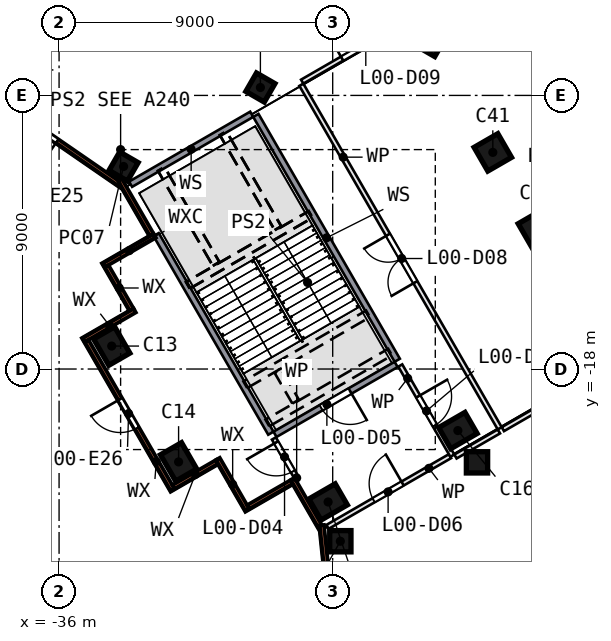
"""IFC4 building model, lengths in metres.
Left out: names, types, materials, properties, quantities, classifications, styles, units other than length and angle.
Written with IfcOpenShell. Run it as: python <this file> out.ifc"""

import sys

from ifc_helpers import new_model, si_unit, direction, frame, frame_2d, origin, origin_2d, place, context, subcontext, project, spatial, rectangle, extrude, element, fill, save


model = new_model("IFC4")
c1 = context("Model", 3, precision=1e-05, world=origin(), true_north=direction((0.0, 1.0)))
c2 = subcontext(c1, "Body", "Model", "MODEL_VIEW")
j1 = project(units=[si_unit("LENGTHUNIT", "METRE"), si_unit("PLANEANGLEUNIT", "RADIAN")], contexts=[c1])
p1 = place(None, origin())
s1 = spatial("IfcSite", under=j1, at=p1, CompositionType="ELEMENT")
p2 = place(p1, origin())
s2 = spatial("IfcBuilding", under=s1, at=p2, CompositionType="ELEMENT")
p3 = place(p2, origin())
s3 = spatial("IfcBuildingStorey", under=s2, at=p3, CompositionType="ELEMENT", Elevation=0.0)
p4 = place(p3, frame((-23.658, -6.846, 0.0), z_axis=(0.0, 0.0, 1.0), x_axis=(0.5, 0.866025404, 0.0)))
e1 = element("IfcColumn", 1, at=p4, inside=s3, PredefinedType="COLUMN", context=c2, shape_type="SweptSolid", body=[
    extrude(rectangle(XDim=1.5, YDim=0.9, at=origin_2d()), origin(), (0.0, 0.0, 1.0), 7.55),
])
for number, where, z_axis, x_axis in (
    (2, (-34.269, -17.245, 0.0), (0.0, 0.0, 1.0), (0.5, -0.866, 0.0)),
    (3, (-32.069, -21.055, 0.0), (0.0, 0.0, 1.0), (0.5, -0.866, 0.0)),
    (4, (-27.151, -22.373, 0.0), (0.0, 0.0, 1.0), (0.866, 0.5, 0.0)),
    (5, (-22.883, -20.024, 0.0), (0.0, 0.0, 1.0), (0.866, 0.5, 0.0)),
):
    element("IfcColumn", number, at=place(p3, frame(where, z_axis=z_axis, x_axis=x_axis)), inside=s3, PredefinedType="COLUMN", context=c2, shape_type="SweptSolid", body=[
        extrude(rectangle(XDim=1.0, YDim=0.8, at=origin_2d()), origin(), (0.0, 0.0, 1.0), 7.55),
    ])
for number, where, z_axis, x_axis in (
    (6, (-21.733, -10.873, 0.0), (0.0, 0.0, 1.0), (-0.866, -0.5, 0.0)),
    (7, (-20.283, -13.385, 0.0), (0.0, 0.0, 1.0), (-0.866, -0.5, 0.0)),
):
    element("IfcColumn", number, at=place(p3, frame(where, z_axis=z_axis, x_axis=x_axis)), inside=s3, PredefinedType="COLUMN", context=c2, shape_type="SweptSolid", body=[
        extrude(rectangle(XDim=0.9, YDim=0.9, at=origin_2d()), origin(), (0.0, 0.0, 1.0), 7.55),
    ])
for number, where, z_axis, x_axis in (
    (8, (-29.378, -8.74, 0.0), (0.0, 0.0, 1.0), (-0.866, 0.5, 0.0)),
    (9, (-33.878, -11.338, 0.0), (0.0, 0.0, 1.0), (-0.866, 0.5, 0.0)),
    (10, (-26.749, -23.665, 0.0), (0.0, 0.0, 1.0), (0.0, -1.0, 0.0)),
    (11, (-22.253, -21.07, 0.0), (0.0, 0.0, 1.0), (0.0, -1.0, 0.0)),
):
    element("IfcColumn", number, at=place(p3, frame(where, z_axis=z_axis, x_axis=x_axis)), inside=s3, PredefinedType="COLUMN", context=c2, shape_type="SweptSolid", body=[
        extrude(rectangle(XDim=0.7, YDim=0.7, at=origin_2d()), origin(), (0.0, 0.0, 1.0), 8.0),
    ])
p5 = place(p3, frame((-33.989, -11.93, 0.0), z_axis=(0.0, 0.0, 1.0), x_axis=(-0.823449914, 0.567388967, 0.0)))
e12 = element("IfcWall", 12, at=p5, inside=s3, PredefinedType="SOLIDWALL", context=c2, shape_type="SweptSolid", body=[
    extrude(rectangle(XDim=17.4, YDim=0.14, at=frame_2d((8.7, 0.0))), origin(), (0.0, 0.0, 1.0), 7.55),
])
p6 = place(p5, frame((7.264, 0.0, 0.0)))
e13 = element("IfcOpeningElement", 13, at=p6, cuts=e12, PredefinedType="OPENING", context=c2, shape_type="SweptSolid", body=[
    extrude(rectangle(XDim=1.1, YDim=2.4, at=frame_2d((0.55, 1.2))), frame((0.0, 0.08, 0.0), z_axis=(0.0, -1.0, 0.0), x_axis=(1.0, 0.0, 0.0)), (0.0, 0.0, 1.0), 0.16),
])
p7 = place(p5, frame((2.518, 0.0, 0.0)))
e14 = element("IfcOpeningElement", 14, at=p7, cuts=e12, PredefinedType="OPENING", context=c2, shape_type="SweptSolid", body=[
    extrude(rectangle(XDim=1.1, YDim=2.4, at=frame_2d((0.55, 1.2))), frame((0.0, 0.08, 0.0), z_axis=(0.0, -1.0, 0.0), x_axis=(1.0, 0.0, 0.0)), (0.0, 0.0, 1.0), 0.16),
])
p8 = place(p3, frame((-34.035, -11.71, 0.0), z_axis=(0.0, 0.0, 1.0), x_axis=(0.49995231, -0.866052936, 0.0)))
e15 = element("IfcWall", 15, at=p8, inside=s3, PredefinedType="SOLIDWALL", context=c2, shape_type="SweptSolid", body=[
    extrude(rectangle(XDim=2.176, YDim=0.14, at=frame_2d((1.088, 0.0))), origin(), (0.0, 0.0, 1.0), 7.55),
])
p9 = place(p3, frame((-32.851, -13.62, 0.0), z_axis=(0.0, 0.0, 1.0), x_axis=(-0.866011627, -0.500023862, 0.0)))
e16 = element("IfcWall", 16, at=p9, inside=s3, PredefinedType="SOLIDWALL", context=c2, shape_type="SweptSolid", body=[
    extrude(rectangle(XDim=1.94, YDim=0.14, at=frame_2d((0.97, 0.0))), origin(), (0.0, 0.0, 1.0), 7.55),
])
p10 = place(p3, frame((-34.436, -14.616, 0.0), z_axis=(0.0, 0.0, 1.0), x_axis=(0.500061949, -0.865989634, 0.0)))
e17 = element("IfcWall", 17, at=p10, inside=s3, PredefinedType="SOLIDWALL", context=c2, shape_type="SweptSolid", body=[
    extrude(rectangle(XDim=1.66, YDim=0.14, at=frame_2d((0.83, 0.0))), origin(), (0.0, 0.0, 1.0), 7.55),
])
p11 = place(p3, frame((-33.51, -16.079, 0.0), z_axis=(0.0, 0.0, 1.0), x_axis=(-0.866011627, -0.500023862, 0.0)))
e18 = element("IfcWall", 18, at=p11, inside=s3, PredefinedType="SOLIDWALL", context=c2, shape_type="SweptSolid", body=[
    extrude(rectangle(XDim=1.94, YDim=0.14, at=frame_2d((0.97, 0.0))), origin(), (0.0, 0.0, 1.0), 7.55),
])
p12 = place(p3, frame((-32.264, -21.977, 0.0), z_axis=(0.0, 0.0, 1.0), x_axis=(-0.499998748, 0.866026127, 0.0)))
e19 = element("IfcWall", 19, at=p12, inside=s3, PredefinedType="SOLIDWALL", context=c2, shape_type="SweptSolid", body=[
    extrude(rectangle(XDim=5.66, YDim=0.14, at=frame_2d((2.83, 0.0))), origin(), (0.0, 0.0, 1.0), 7.55),
])
p13 = place(p12, frame((2.35, 0.0, 0.0)))
e20 = element("IfcOpeningElement", 20, at=p13, cuts=e19, PredefinedType="OPENING", context=c2, shape_type="SweptSolid", body=[
    extrude(rectangle(XDim=1.1, YDim=2.4, at=frame_2d((0.55, 1.2))), frame((0.0, 0.08, 0.0), z_axis=(0.0, -1.0, 0.0), x_axis=(1.0, 0.0, 0.0)), (0.0, 0.0, 1.0), 0.16),
])
p14 = place(p3, frame((-32.239, -21.881, 0.0), z_axis=(0.0, 0.0, 1.0), x_axis=(0.866026406, 0.499998264, 0.0)))
e21 = element("IfcWall", 21, at=p14, inside=s3, PredefinedType="SOLIDWALL", context=c2, shape_type="SweptSolid", body=[
    extrude(rectangle(XDim=1.66, YDim=0.14, at=frame_2d((0.83, 0.0))), origin(), (0.0, 0.0, 1.0), 7.55),
])
p15 = place(p3, frame((-30.775, -20.955, 0.0), z_axis=(0.0, 0.0, 1.0), x_axis=(0.499969368, -0.866043088, 0.0)))
e22 = element("IfcWall", 22, at=p15, inside=s3, PredefinedType="SOLIDWALL", context=c2, shape_type="SweptSolid", body=[
    extrude(rectangle(XDim=1.94, YDim=0.14, at=frame_2d((0.97, 0.0))), origin(), (0.0, 0.0, 1.0), 7.55),
])
p16 = place(p3, frame((-29.78, -22.54, 0.0), z_axis=(0.0, 0.0, 1.0), x_axis=(0.865989634, 0.500061949, 0.0)))
e23 = element("IfcWall", 23, at=p16, inside=s3, PredefinedType="SOLIDWALL", context=c2, shape_type="SweptSolid", body=[
    extrude(rectangle(XDim=1.66, YDim=0.14, at=frame_2d((0.83, 0.0))), origin(), (0.0, 0.0, 1.0), 7.55),
])
p17 = place(p3, frame((-28.317, -21.614, 0.0), z_axis=(0.0, 0.0, 1.0), x_axis=(0.499983248, -0.866035075, 0.0)))
e24 = element("IfcWall", 24, at=p17, inside=s3, PredefinedType="SOLIDWALL", context=c2, shape_type="SweptSolid", body=[
    extrude(rectangle(XDim=1.783, YDim=0.14, at=frame_2d((0.891, 0.0))), origin(), (0.0, 0.0, 1.0), 7.55),
])
p18 = place(p3, frame((-25.925, -36.773, 0.0), z_axis=(0.0, 0.0, 1.0), x_axis=(-0.104443805, 0.99453079, 0.0)))
e25 = element("IfcWall", 25, at=p18, inside=s3, PredefinedType="SOLIDWALL", context=c2, shape_type="SweptSolid", body=[
    extrude(rectangle(XDim=13.712, YDim=0.14, at=frame_2d((6.856, 0.0))), origin(), (0.0, 0.0, 1.0), 7.55),
])
p19 = place(p18, frame((9.383, 0.0, 0.0)))
e26 = element("IfcOpeningElement", 26, at=p19, cuts=e25, PredefinedType="OPENING", context=c2, shape_type="SweptSolid", body=[
    extrude(rectangle(XDim=1.1, YDim=2.4, at=frame_2d((0.55, 1.2))), frame((0.0, 0.08, 0.0), z_axis=(0.0, -1.0, 0.0), x_axis=(1.0, 0.0, 0.0)), (0.0, 0.0, 1.0), 0.16),
])
p20 = place(p18, frame((3.004, 0.0, 0.0)))
e27 = element("IfcOpeningElement", 27, at=p20, cuts=e25, PredefinedType="OPENING", context=c2, shape_type="SweptSolid", body=[
    extrude(rectangle(XDim=1.1, YDim=2.4, at=frame_2d((0.55, 1.2))), frame((0.0, 0.08, 0.0), z_axis=(0.0, -1.0, 0.0), x_axis=(1.0, 0.0, 0.0)), (0.0, 0.0, 1.0), 0.16),
])
p21 = place(p3, frame((-32.807, -13.577, 0.0), z_axis=(0.0, 0.0, 1.0), x_axis=(0.50000534, -0.866022321, 0.0)))
e28 = element("IfcWall", 28, at=p21, inside=s3, PredefinedType="SOLIDWALL", context=c2, shape_type="SweptSolid", body=[
    extrude(rectangle(XDim=7.545, YDim=0.2, at=frame_2d((3.773, 0.0))), origin(), (0.0, 0.0, 1.0), 7.55),
])
p22 = place(p3, frame((-29.664, -9.621, 0.0), z_axis=(0.0, 0.0, 1.0), x_axis=(-0.866030039, -0.499991972, 0.0)))
e29 = element("IfcWall", 29, at=p22, inside=s3, PredefinedType="SOLIDWALL", context=c2, shape_type="SweptSolid", body=[
    extrude(rectangle(XDim=4.6, YDim=0.2, at=frame_2d((2.3, 0.0))), origin(), (0.0, 0.0, 1.0), 7.55),
])
p23 = place(p3, frame((-28.162, -21.623, 0.0), z_axis=(0.0, 0.0, 1.0), x_axis=(-0.499877454, 0.866096144, 0.0)))
e30 = element("IfcWall", 30, at=p23, inside=s3, PredefinedType="PARTITIONING", context=c2, shape_type="SweptSolid", body=[
    extrude(rectangle(XDim=1.545, YDim=0.15, at=frame_2d((0.773, 0.0))), origin(), (0.0, 0.0, 1.0), 7.55),
])
p24 = place(p23, frame((0.295, 0.0, 0.0)))
e31 = element("IfcOpeningElement", 31, at=p24, cuts=e30, PredefinedType="OPENING", context=c2, shape_type="SweptSolid", body=[
    extrude(rectangle(XDim=1.1, YDim=2.1, at=frame_2d((0.55, 1.05))), frame((0.0, 0.085, 0.0), z_axis=(0.0, -1.0, 0.0), x_axis=(1.0, 0.0, 0.0)), (0.0, 0.0, 1.0), 0.17),
])
p25 = place(p3, frame((-24.914, -17.848, 0.0), z_axis=(0.0, 0.0, 1.0), x_axis=(-0.86601677, -0.500014953, 0.0)))
e32 = element("IfcWall", 32, at=p25, inside=s3, PredefinedType="SOLIDWALL", context=c2, shape_type="SweptSolid", body=[
    extrude(rectangle(XDim=4.6, YDim=0.2, at=frame_2d((2.3, 0.0))), origin(), (0.0, 0.0, 1.0), 7.55),
])
p26 = place(p25, frame((1.75, 0.0, 0.0)))
e33 = element("IfcOpeningElement", 33, at=p26, cuts=e32, PredefinedType="OPENING", context=c2, shape_type="SweptSolid", body=[
    extrude(rectangle(XDim=1.1, YDim=2.1, at=frame_2d((0.55, 1.05))), frame((0.0, 0.11, 0.0), z_axis=(0.0, -1.0, 0.0), x_axis=(1.0, 0.0, 0.0)), (0.0, 0.0, 1.0), 0.22),
])
p27 = place(p3, frame((-27.169, -23.192, 0.0), z_axis=(0.0, 0.0, 1.0), x_axis=(0.866011597, 0.500023913, 0.0)))
e34 = element("IfcWall", 34, at=p27, inside=s3, PredefinedType="PARTITIONING", context=c2, shape_type="SweptSolid", body=[
    extrude(rectangle(XDim=4.65, YDim=0.15, at=frame_2d((2.325, 0.0))), origin(), (0.0, 0.0, 1.0), 7.55),
])
p28 = place(p27, frame((1.75, 0.0, 0.0)))
e35 = element("IfcOpeningElement", 35, at=p28, cuts=e34, PredefinedType="OPENING", context=c2, shape_type="SweptSolid", body=[
    extrude(rectangle(XDim=1.1, YDim=2.1, at=frame_2d((0.55, 1.05))), frame((0.0, 0.085, 0.0), z_axis=(0.0, -1.0, 0.0), x_axis=(1.0, 0.0, 0.0)), (0.0, 0.0, 1.0), 0.17),
])
p29 = place(p3, frame((-24.877, -17.712, 0.0), z_axis=(0.0, 0.0, 1.0), x_axis=(-0.499984537, 0.866034331, 0.0)))
e36 = element("IfcWall", 36, at=p29, inside=s3, PredefinedType="SOLIDWALL", context=c2, shape_type="SweptSolid", body=[
    extrude(rectangle(XDim=9.3, YDim=0.2, at=frame_2d((4.65, 0.0))), origin(), (0.0, 0.0, 1.0), 7.55),
])
p30 = place(p3, frame((-24.777, -17.885, 0.0), z_axis=(0.0, 0.0, 1.0), x_axis=(0.500041249, -0.866001587, 0.0)))
e37 = element("IfcWall", 37, at=p30, inside=s3, PredefinedType="PARTITIONING", context=c2, shape_type="SweptSolid", body=[
    extrude(rectangle(XDim=3.425, YDim=0.15, at=frame_2d((1.712, 0.0))), origin(), (0.0, 0.0, 1.0), 7.55),
])
p31 = place(p30, frame((1.175, 0.0, 0.0)))
e38 = element("IfcOpeningElement", 38, at=p31, cuts=e37, PredefinedType="OPENING", context=c2, shape_type="SweptSolid", body=[
    extrude(rectangle(XDim=1.1, YDim=2.1, at=frame_2d((0.55, 1.05))), frame((0.0, 0.085, 0.0), z_axis=(0.0, -1.0, 0.0), x_axis=(1.0, 0.0, 0.0)), (0.0, 0.0, 1.0), 0.17),
])
p32 = place(p3, frame((-22.962, -20.878, 0.0), z_axis=(0.0, 0.0, 1.0), x_axis=(0.866040212, 0.499974351, 0.0)))
e39 = element("IfcWall", 39, at=p32, inside=s3, PredefinedType="PARTITIONING", context=c2, shape_type="SweptSolid", body=[
    extrude(rectangle(XDim=1.65, YDim=0.15, at=frame_2d((0.825, 0.0))), origin(), (0.0, 0.0, 1.0), 7.55),
])
p33 = place(p3, frame((-21.506, -19.951, 0.0), z_axis=(0.0, 0.0, 1.0), x_axis=(-0.499998298, 0.866026387, 0.0)))
e40 = element("IfcWall", 40, at=p33, inside=s3, PredefinedType="PARTITIONING", context=c2, shape_type="SweptSolid", body=[
    extrude(rectangle(XDim=13.05, YDim=0.15, at=frame_2d((6.525, 0.0))), origin(), (0.0, 0.0, 1.0), 7.55),
])
p34 = place(p33, frame((5.55, 0.0, 0.0)))
e41 = element("IfcOpeningElement", 41, at=p34, cuts=e40, PredefinedType="OPENING", context=c2, shape_type="SweptSolid", body=[
    extrude(rectangle(XDim=1.8, YDim=2.1, at=frame_2d((0.9, 1.05))), frame((0.0, 0.085, 0.0), z_axis=(0.0, -1.0, 0.0), x_axis=(1.0, 0.0, 0.0)), (0.0, 0.0, 1.0), 0.17),
])
p35 = place(p3, frame((-21.404, -19.979, 0.0), z_axis=(0.0, 0.0, 1.0), x_axis=(0.866005103, 0.50003516, 0.0)))
e42 = element("IfcWall", 42, at=p35, inside=s3, PredefinedType="PARTITIONING", context=c2, shape_type="SweptSolid", body=[
    extrude(rectangle(XDim=4.866, YDim=0.15, at=frame_2d((2.433, 0.0))), origin(), (0.0, 0.0, 1.0), 7.55),
])
p36 = place(p3, frame((-28.003, -8.547, 0.0), z_axis=(0.0, 0.0, 1.0), x_axis=(0.866014286, 0.500019257, 0.0)))
e43 = element("IfcWall", 43, at=p36, inside=s3, PredefinedType="PARTITIONING", context=c2, shape_type="SweptSolid", body=[
    extrude(rectangle(XDim=4.865, YDim=0.15, at=frame_2d((2.433, 0.0))), origin(), (0.0, 0.0, 1.0), 7.55),
])
p37 = place(p36, frame((1.516, 0.0, 0.0)))
e44 = element("IfcOpeningElement", 44, at=p37, cuts=e43, PredefinedType="OPENING", context=c2, shape_type="SweptSolid", body=[
    extrude(rectangle(XDim=1.8, YDim=2.1, at=frame_2d((0.9, 1.05))), frame((0.0, 0.085, 0.0), z_axis=(0.0, -1.0, 0.0), x_axis=(1.0, 0.0, 0.0)), (0.0, 0.0, 1.0), 0.17),
])
p38 = place(p7, origin())
e45 = element("IfcDoor", 45, at=p38, inside=s3, OperationType="SINGLE_SWING_LEFT", PredefinedType="DOOR", context=c2, shape_type="SweptSolid", body=[
    extrude(rectangle(XDim=1.1, YDim=2.4, at=frame_2d((0.55, 1.2))), frame((0.0, 0.025, 0.0), z_axis=(0.0, -1.0, 0.0), x_axis=(1.0, 0.0, 0.0)), (0.0, 0.0, 1.0), 0.05),
])
fill(e14, e45)
p39 = place(p13, origin())
e46 = element("IfcDoor", 46, at=p39, inside=s3, OperationType="SINGLE_SWING_RIGHT", PredefinedType="DOOR", context=c2, shape_type="SweptSolid", body=[
    extrude(rectangle(XDim=1.1, YDim=2.4, at=frame_2d((0.55, 1.2))), frame((0.0, 0.025, 0.0), z_axis=(0.0, -1.0, 0.0), x_axis=(1.0, 0.0, 0.0)), (0.0, 0.0, 1.0), 0.05),
])
fill(e20, e46)
p40 = place(p24, origin())
e47 = element("IfcDoor", 47, at=p40, inside=s3, OperationType="SINGLE_SWING_RIGHT", PredefinedType="DOOR", context=c2, shape_type="SweptSolid", body=[
    extrude(rectangle(XDim=1.1, YDim=2.1, at=frame_2d((0.55, 1.05))), frame((0.0, 0.025, 0.0), z_axis=(0.0, -1.0, 0.0), x_axis=(1.0, 0.0, 0.0)), (0.0, 0.0, 1.0), 0.05),
])
fill(e31, e47)
p41 = place(p26, origin())
e48 = element("IfcDoor", 48, at=p41, inside=s3, OperationType="SINGLE_SWING_LEFT", PredefinedType="DOOR", context=c2, shape_type="SweptSolid", body=[
    extrude(rectangle(XDim=1.1, YDim=2.1, at=frame_2d((0.55, 1.05))), frame((0.0, 0.025, 0.0), z_axis=(0.0, -1.0, 0.0), x_axis=(1.0, 0.0, 0.0)), (0.0, 0.0, 1.0), 0.05),
])
fill(e33, e48)
p42 = place(p28, origin())
e49 = element("IfcDoor", 49, at=p42, inside=s3, OperationType="SINGLE_SWING_RIGHT", PredefinedType="DOOR", context=c2, shape_type="SweptSolid", body=[
    extrude(rectangle(XDim=1.1, YDim=2.1, at=frame_2d((0.55, 1.05))), frame((0.0, 0.025, 0.0), z_axis=(0.0, -1.0, 0.0), x_axis=(1.0, 0.0, 0.0)), (0.0, 0.0, 1.0), 0.05),
])
fill(e35, e49)
p43 = place(p31, origin())
e50 = element("IfcDoor", 50, at=p43, inside=s3, OperationType="SINGLE_SWING_LEFT", PredefinedType="DOOR", context=c2, shape_type="SweptSolid", body=[
    extrude(rectangle(XDim=1.1, YDim=2.1, at=frame_2d((0.55, 1.05))), frame((0.0, 0.025, 0.0), z_axis=(0.0, -1.0, 0.0), x_axis=(1.0, 0.0, 0.0)), (0.0, 0.0, 1.0), 0.05),
])
fill(e38, e50)
p44 = place(p34, origin())
e51 = element("IfcDoor", 51, at=p44, inside=s3, OperationType="DOUBLE_DOOR_SINGLE_SWING", PredefinedType="DOOR", context=c2, shape_type="SweptSolid", body=[
    extrude(rectangle(XDim=1.8, YDim=2.1, at=frame_2d((0.9, 1.05))), frame((0.0, 0.025, 0.0), z_axis=(0.0, -1.0, 0.0), x_axis=(1.0, 0.0, 0.0)), (0.0, 0.0, 1.0), 0.05),
])
fill(e41, e51)
p45 = place(p37, origin())
e52 = element("IfcDoor", 52, at=p45, inside=s3, OperationType="DOUBLE_DOOR_SINGLE_SWING", PredefinedType="DOOR", context=c2, shape_type="SweptSolid", body=[
    extrude(rectangle(XDim=1.8, YDim=2.1, at=frame_2d((0.9, 1.05))), frame((0.0, 0.025, 0.0), z_axis=(0.0, -1.0, 0.0), x_axis=(1.0, 0.0, 0.0)), (0.0, 0.0, 1.0), 0.05),
])
fill(e44, e52)
save(model, sys.argv[1])
